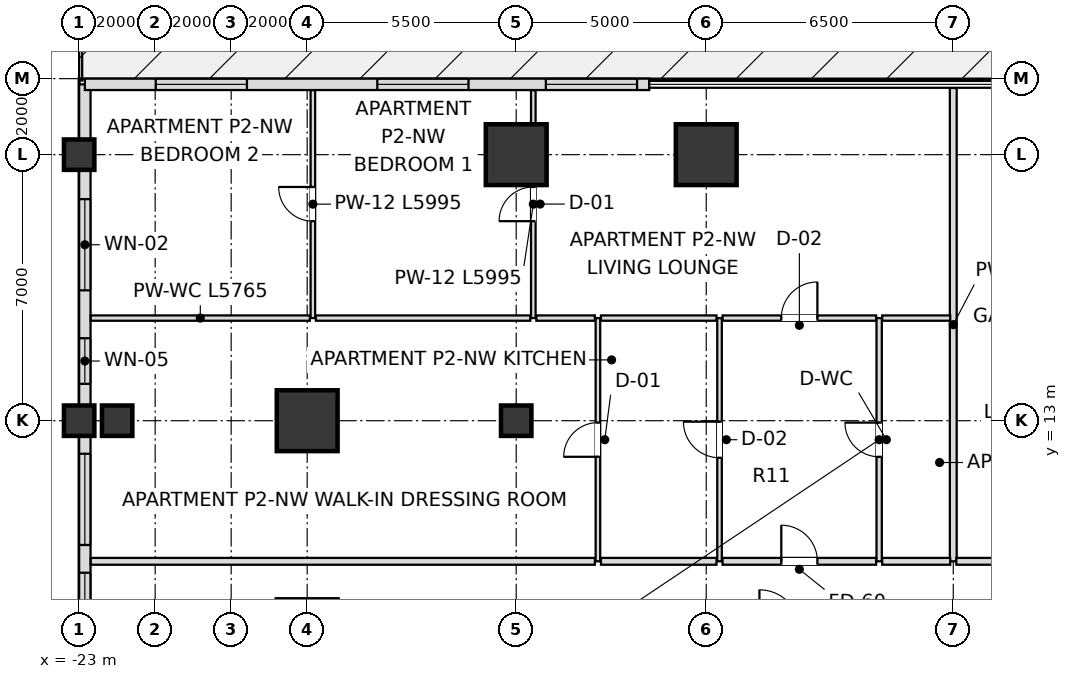
"""IFC4 building model, lengths in metres.
Left out: names, types, materials, properties, quantities, classifications, styles, units other than length and angle.
Written with IfcOpenShell. Run it as: python <this file> out.ifc"""

import sys

from ifc_helpers import new_model, si_unit, direction, frame, frame_2d, origin, origin_2d, place, context, subcontext, project, spatial, rectangle, extrude, element, fill, save


model = new_model("IFC4")
c1 = context("Model", 3, precision=1e-05, world=origin(), true_north=direction((0.0, 1.0)))
c2 = subcontext(c1, "Body", "Model", "MODEL_VIEW")
j1 = project(units=[si_unit("LENGTHUNIT", "METRE"), si_unit("PLANEANGLEUNIT", "RADIAN")], contexts=[c1])
p1 = place(None, origin())
s1 = spatial("IfcSite", under=j1, at=p1, CompositionType="ELEMENT")
p2 = place(p1, origin())
s2 = spatial("IfcBuilding", under=s1, at=p2, CompositionType="ELEMENT")
p3 = place(p2, frame((0.0, 0.0, 11.4)))
s3 = spatial("IfcBuildingStorey", under=s2, at=p3, CompositionType="ELEMENT", Elevation=11.4)
for number, where, z_axis, x_axis in (
    (1, (-6.5, 20.0, 0.0), (0.0, 0.0, 1.0), (1.0, 0.0, 0.0)),
    (2, (-11.5, 20.0, 0.0), (0.0, 0.0, 1.0), (1.0, 0.0, 0.0)),
    (3, (-17.0, 13.0, 0.0), (0.0, 0.0, 1.0), (1.0, 0.0, 0.0)),
):
    element("IfcColumn", number, at=place(p3, frame(where, z_axis=z_axis, x_axis=x_axis)), inside=s3, PredefinedType="USERDEFINED", context=c2, shape_type="SweptSolid", body=[
        extrude(rectangle(XDim=1.6, YDim=1.6, at=origin_2d()), origin(), (0.0, 0.0, 1.0), 5.4),
    ])
for number, where, z_axis, x_axis in (
    (4, (-23.0, 13.0, 0.0), (0.0, 0.0, 1.0), (1.0, 0.0, 0.0)),
    (5, (-23.0, 20.0, 0.0), (0.0, 0.0, 1.0), (1.0, 0.0, 0.0)),
    (6, (-11.5, 13.0, 0.0), (0.0, 0.0, 1.0), (1.0, 0.0, 0.0)),
    (7, (-22.0, 13.0, 0.0), (0.0, 0.0, 1.0), (1.0, 0.0, 0.0)),
):
    element("IfcColumn", number, at=place(p3, frame(where, z_axis=z_axis, x_axis=x_axis)), inside=s3, PredefinedType="COLUMN", context=c2, shape_type="SweptSolid", body=[
        extrude(rectangle(XDim=0.8, YDim=0.8, at=origin_2d()), origin(), (0.0, 0.0, 1.0), 5.4),
    ])
p4 = place(p3, frame((-22.85, 21.85, 0.0), z_axis=(0.0, 0.0, 1.0), x_axis=(0.0, -1.0, 0.0)))
e8 = element("IfcWall", 8, at=p4, inside=s3, PredefinedType="SOLIDWALL", context=c2, shape_type="SweptSolid", body=[
    extrude(rectangle(XDim=43.7, YDim=0.3, at=frame_2d((21.85, 0.0))), origin(), (0.0, 0.0, 1.0), 4.476),
])
p5 = place(p4, frame((3.02, 0.0, 0.8)))
e9 = element("IfcOpeningElement", 9, at=p5, cuts=e8, PredefinedType="OPENING", context=c2, shape_type="SweptSolid", body=[
    extrude(rectangle(XDim=2.4, YDim=2.2, at=frame_2d((1.2, 1.1))), frame((0.0, 0.16, 0.0), z_axis=(0.0, -1.0, 0.0), x_axis=(1.0, 0.0, 0.0)), (0.0, 0.0, 1.0), 0.32),
])
p6 = place(p4, frame((6.68, 0.0, 0.72)))
e10 = element("IfcOpeningElement", 10, at=p6, cuts=e8, PredefinedType="OPENING", context=c2, shape_type="SweptSolid", body=[
    extrude(rectangle(XDim=1.2, YDim=1.68, at=frame_2d((0.6, 0.84))), frame((0.0, 0.16, 0.0), z_axis=(0.0, -1.0, 0.0), x_axis=(1.0, 0.0, 0.0)), (0.0, 0.0, 1.0), 0.32),
])
p7 = place(p4, frame((9.72, 0.0, 0.8)))
e11 = element("IfcOpeningElement", 11, at=p7, cuts=e8, PredefinedType="OPENING", context=c2, shape_type="SweptSolid", body=[
    extrude(rectangle(XDim=2.4, YDim=2.2, at=frame_2d((1.2, 1.1))), frame((0.0, 0.16, 0.0), z_axis=(0.0, -1.0, 0.0), x_axis=(1.0, 0.0, 0.0)), (0.0, 0.0, 1.0), 0.32),
])
p8 = place(p4, frame((12.85, 0.0, 0.72)))
e12 = element("IfcOpeningElement", 12, at=p8, cuts=e8, PredefinedType="OPENING", context=c2, shape_type="SweptSolid", body=[
    extrude(rectangle(XDim=1.2, YDim=1.68, at=frame_2d((0.6, 0.84))), frame((0.0, 0.16, 0.0), z_axis=(0.0, -1.0, 0.0), x_axis=(1.0, 0.0, 0.0)), (0.0, 0.0, 1.0), 0.32),
])
p9 = place(p4, frame((14.995, 0.0, 0.8)))
e13 = element("IfcOpeningElement", 13, at=p9, cuts=e8, PredefinedType="OPENING", context=c2, shape_type="SweptSolid", body=[
    extrude(rectangle(XDim=2.4, YDim=2.2, at=frame_2d((1.2, 1.1))), frame((0.0, 0.16, 0.0), z_axis=(0.0, -1.0, 0.0), x_axis=(1.0, 0.0, 0.0)), (0.0, 0.0, 1.0), 0.32),
])
p10 = place(p4, frame((18.365, 0.0, 0.8)))
e14 = element("IfcOpeningElement", 14, at=p10, cuts=e8, PredefinedType="OPENING", context=c2, shape_type="SweptSolid", body=[
    extrude(rectangle(XDim=2.4, YDim=2.2, at=frame_2d((1.2, 1.1))), frame((0.0, 0.16, 0.0), z_axis=(0.0, -1.0, 0.0), x_axis=(1.0, 0.0, 0.0)), (0.0, 0.0, 1.0), 0.32),
])
p11 = place(p4, frame((22.935, 0.0, 0.8)))
e15 = element("IfcOpeningElement", 15, at=p11, cuts=e8, PredefinedType="OPENING", context=c2, shape_type="SweptSolid", body=[
    extrude(rectangle(XDim=2.4, YDim=2.2, at=frame_2d((1.2, 1.1))), frame((0.0, 0.16, 0.0), z_axis=(0.0, -1.0, 0.0), x_axis=(1.0, 0.0, 0.0)), (0.0, 0.0, 1.0), 0.32),
])
p12 = place(p4, frame((26.305, 0.0, 0.8)))
e16 = element("IfcOpeningElement", 16, at=p12, cuts=e8, PredefinedType="OPENING", context=c2, shape_type="SweptSolid", body=[
    extrude(rectangle(XDim=2.4, YDim=2.2, at=frame_2d((1.2, 1.1))), frame((0.0, 0.16, 0.0), z_axis=(0.0, -1.0, 0.0), x_axis=(1.0, 0.0, 0.0)), (0.0, 0.0, 1.0), 0.32),
])
p13 = place(p4, frame((29.65, 0.0, 0.72)))
e17 = element("IfcOpeningElement", 17, at=p13, cuts=e8, PredefinedType="OPENING", context=c2, shape_type="SweptSolid", body=[
    extrude(rectangle(XDim=1.2, YDim=1.68, at=frame_2d((0.6, 0.84))), frame((0.0, 0.16, 0.0), z_axis=(0.0, -1.0, 0.0), x_axis=(1.0, 0.0, 0.0)), (0.0, 0.0, 1.0), 0.32),
])
p14 = place(p4, frame((31.58, 0.0, 0.8)))
e18 = element("IfcOpeningElement", 18, at=p14, cuts=e8, PredefinedType="OPENING", context=c2, shape_type="SweptSolid", body=[
    extrude(rectangle(XDim=2.4, YDim=2.2, at=frame_2d((1.2, 1.1))), frame((0.0, 0.16, 0.0), z_axis=(0.0, -1.0, 0.0), x_axis=(1.0, 0.0, 0.0)), (0.0, 0.0, 1.0), 0.32),
])
p15 = place(p4, frame((37.15, 0.0, 0.8)))
e19 = element("IfcOpeningElement", 19, at=p15, cuts=e8, PredefinedType="OPENING", context=c2, shape_type="SweptSolid", body=[
    extrude(rectangle(XDim=2.4, YDim=2.2, at=frame_2d((1.2, 1.1))), frame((0.0, 0.16, 0.0), z_axis=(0.0, -1.0, 0.0), x_axis=(1.0, 0.0, 0.0)), (0.0, 0.0, 1.0), 0.32),
])
p16 = place(p3, frame((-22.85, 21.85, 0.0), z_axis=(0.0, 0.0, 1.0), x_axis=(1.0, 0.0, 0.0)))
e20 = element("IfcWall", 20, at=p16, inside=s3, PredefinedType="SOLIDWALL", context=c2, shape_type="SweptSolid", body=[
    extrude(rectangle(XDim=14.85, YDim=0.3, at=frame_2d((7.425, 0.0))), origin(), (0.0, 0.0, 1.0), 5.12),
])
p17 = place(p16, frame((1.865, 0.0, 0.8)))
e21 = element("IfcOpeningElement", 21, at=p17, cuts=e20, PredefinedType="OPENING", context=c2, shape_type="SweptSolid", body=[
    extrude(rectangle(XDim=2.4, YDim=2.2, at=frame_2d((1.2, 1.1))), frame((0.0, 0.16, 0.0), z_axis=(0.0, -1.0, 0.0), x_axis=(1.0, 0.0, 0.0)), (0.0, 0.0, 1.0), 0.32),
])
p18 = place(p16, frame((7.695, 0.0, 0.8)))
e22 = element("IfcOpeningElement", 22, at=p18, cuts=e20, PredefinedType="OPENING", context=c2, shape_type="SweptSolid", body=[
    extrude(rectangle(XDim=2.4, YDim=2.2, at=frame_2d((1.2, 1.1))), frame((0.0, 0.16, 0.0), z_axis=(0.0, -1.0, 0.0), x_axis=(1.0, 0.0, 0.0)), (0.0, 0.0, 1.0), 0.32),
])
p19 = place(p16, frame((12.13, 0.0, 0.8)))
e23 = element("IfcOpeningElement", 23, at=p19, cuts=e20, PredefinedType="OPENING", context=c2, shape_type="SweptSolid", body=[
    extrude(rectangle(XDim=2.4, YDim=2.2, at=frame_2d((1.2, 1.1))), frame((0.0, 0.16, 0.0), z_axis=(0.0, -1.0, 0.0), x_axis=(1.0, 0.0, 0.0)), (0.0, 0.0, 1.0), 0.32),
])
p20 = place(p3, frame((-16.85, 15.7, 0.0), z_axis=(0.0, 0.0, 1.0), x_axis=(0.0, 1.0, 0.0)))
e24 = element("IfcWall", 24, at=p20, inside=s3, PredefinedType="PARTITIONING", context=c2, shape_type="SweptSolid", body=[
    extrude(rectangle(XDim=5.995, YDim=0.12, at=frame_2d((2.998, 0.0))), origin(), (0.0, 0.0, 1.0), 4.476),
])
p21 = place(p20, frame((2.55, 0.0, 0.0)))
e25 = element("IfcOpeningElement", 25, at=p21, cuts=e24, PredefinedType="OPENING", context=c2, shape_type="SweptSolid", body=[
    extrude(rectangle(XDim=0.9, YDim=2.1, at=frame_2d((0.45, 1.05))), frame((0.0, 0.07, 0.0), z_axis=(0.0, -1.0, 0.0), x_axis=(1.0, 0.0, 0.0)), (0.0, 0.0, 1.0), 0.14),
])
p22 = place(p3, frame((-11.05, 15.7, 0.0), z_axis=(0.0, 0.0, 1.0), x_axis=(0.0, 1.0, 0.0)))
e26 = element("IfcWall", 26, at=p22, inside=s3, PredefinedType="PARTITIONING", context=c2, shape_type="SweptSolid", body=[
    extrude(rectangle(XDim=5.995, YDim=0.12, at=frame_2d((2.998, 0.0))), origin(), (0.0, 0.0, 1.0), 4.476),
])
p23 = place(p22, frame((2.55, 0.0, 0.0)))
e27 = element("IfcOpeningElement", 27, at=p23, cuts=e26, PredefinedType="OPENING", context=c2, shape_type="SweptSolid", body=[
    extrude(rectangle(XDim=0.9, YDim=2.1, at=frame_2d((0.45, 1.05))), frame((0.0, 0.07, 0.0), z_axis=(0.0, -1.0, 0.0), x_axis=(1.0, 0.0, 0.0)), (0.0, 0.0, 1.0), 0.14),
])
p24 = place(p3, frame((-9.35, 9.3, 0.0), z_axis=(0.0, 0.0, 1.0), x_axis=(0.0, 1.0, 0.0)))
e28 = element("IfcWall", 28, at=p24, inside=s3, PredefinedType="PARTITIONING", context=c2, shape_type="SweptSolid", body=[
    extrude(rectangle(XDim=6.4, YDim=0.12, at=frame_2d((3.2, 0.0))), origin(), (0.0, 0.0, 1.0), 4.41),
])
p25 = place(p24, frame((2.75, 0.0, 0.0)))
e29 = element("IfcOpeningElement", 29, at=p25, cuts=e28, PredefinedType="OPENING", context=c2, shape_type="SweptSolid", body=[
    extrude(rectangle(XDim=0.9, YDim=2.1, at=frame_2d((0.45, 1.05))), frame((0.0, 0.07, 0.0), z_axis=(0.0, -1.0, 0.0), x_axis=(1.0, 0.0, 0.0)), (0.0, 0.0, 1.0), 0.14),
])
p26 = place(p3, frame((-6.15, 9.3, 0.0), z_axis=(0.0, 0.0, 1.0), x_axis=(0.0, 1.0, 0.0)))
e30 = element("IfcWall", 30, at=p26, inside=s3, PredefinedType="PARTITIONING", context=c2, shape_type="SweptSolid", body=[
    extrude(rectangle(XDim=6.4, YDim=0.12, at=frame_2d((3.2, 0.0))), origin(), (0.0, 0.0, 1.0), 5.12),
])
p27 = place(p26, frame((2.725, 0.0, 0.0)))
e31 = element("IfcOpeningElement", 31, at=p27, cuts=e30, PredefinedType="OPENING", context=c2, shape_type="SweptSolid", body=[
    extrude(rectangle(XDim=0.95, YDim=2.1, at=frame_2d((0.475, 1.05))), frame((0.0, 0.07, 0.0), z_axis=(0.0, -1.0, 0.0), x_axis=(1.0, 0.0, 0.0)), (0.0, 0.0, 1.0), 0.14),
])
p28 = place(p3, frame((-1.95, 9.3, 0.0), z_axis=(0.0, 0.0, 1.0), x_axis=(0.0, 1.0, 0.0)))
e32 = element("IfcWall", 32, at=p28, inside=s3, PredefinedType="PARTITIONING", context=c2, shape_type="SweptSolid", body=[
    extrude(rectangle(XDim=6.4, YDim=0.14, at=frame_2d((3.2, 0.0))), origin(), (0.0, 0.0, 1.0), 5.12),
])
p29 = place(p28, frame((2.75, 0.0, 0.0)))
e33 = element("IfcOpeningElement", 33, at=p29, cuts=e32, PredefinedType="OPENING", context=c2, shape_type="SweptSolid", body=[
    extrude(rectangle(XDim=0.9, YDim=2.1, at=frame_2d((0.45, 1.05))), frame((0.0, 0.08, 0.0), z_axis=(0.0, -1.0, 0.0), x_axis=(1.0, 0.0, 0.0)), (0.0, 0.0, 1.0), 0.16),
])
p30 = place(p3, frame((0.0, 9.3, 0.0), z_axis=(0.0, 0.0, 1.0), x_axis=(0.0, 1.0, 0.0)))
e34 = element("IfcWall", 34, at=p30, inside=s3, PredefinedType="PARTITIONING", context=c2, shape_type="SweptSolid", body=[
    extrude(rectangle(XDim=12.455, YDim=0.18, at=frame_2d((6.228, 0.0))), origin(), (0.0, 0.0, 1.0), 4.476),
])
p31 = place(p3, frame((-22.695, 9.3, 0.0), z_axis=(0.0, 0.0, 1.0), x_axis=(1.0, 0.0, 0.0)))
e35 = element("IfcWall", 35, at=p31, inside=s3, PredefinedType="PARTITIONING", context=c2, shape_type="SweptSolid", body=[
    extrude(rectangle(XDim=13.265, YDim=0.18, at=frame_2d((6.633, 0.0))), origin(), (0.0, 0.0, 1.0), 4.41),
])
p32 = place(p3, frame((-9.27, 9.3, 0.0), z_axis=(0.0, 0.0, 1.0), x_axis=(1.0, 0.0, 0.0)))
e36 = element("IfcWall", 36, at=p32, inside=s3, PredefinedType="PARTITIONING", context=c2, shape_type="SweptSolid", body=[
    extrude(rectangle(XDim=3.04, YDim=0.18, at=frame_2d((1.52, 0.0))), origin(), (0.0, 0.0, 1.0), 4.41),
])
p33 = place(p3, frame((-6.07, 9.3, 0.0), z_axis=(0.0, 0.0, 1.0), x_axis=(1.0, 0.0, 0.0)))
e37 = element("IfcWall", 37, at=p33, inside=s3, PredefinedType="PARTITIONING", context=c2, shape_type="SweptSolid", body=[
    extrude(rectangle(XDim=4.04, YDim=0.18, at=frame_2d((2.02, 0.0))), origin(), (0.0, 0.0, 1.0), 5.12),
])
p34 = place(p33, frame((1.545, 0.0, 0.0)))
e38 = element("IfcOpeningElement", 38, at=p34, cuts=e37, PredefinedType="OPENING", context=c2, shape_type="SweptSolid", body=[
    extrude(rectangle(XDim=0.95, YDim=2.15, at=frame_2d((0.475, 1.075))), frame((0.0, 0.1, 0.0), z_axis=(0.0, -1.0, 0.0), x_axis=(1.0, 0.0, 0.0)), (0.0, 0.0, 1.0), 0.2),
])
p35 = place(p3, frame((-1.87, 9.3, 0.0), z_axis=(0.0, 0.0, 1.0), x_axis=(1.0, 0.0, 0.0)))
e39 = element("IfcWall", 39, at=p35, inside=s3, PredefinedType="PARTITIONING", context=c2, shape_type="SweptSolid", body=[
    extrude(rectangle(XDim=1.79, YDim=0.18, at=frame_2d((0.895, 0.0))), origin(), (0.0, 0.0, 1.0), 5.12),
])
p36 = place(p3, frame((0.08, 9.3, 0.0), z_axis=(0.0, 0.0, 1.0), x_axis=(1.0, 0.0, 0.0)))
e40 = element("IfcWall", 40, at=p36, inside=s3, PredefinedType="PARTITIONING", context=c2, shape_type="SweptSolid", body=[
    extrude(rectangle(XDim=14.34, YDim=0.18, at=frame_2d((7.17, 0.0))), origin(), (0.0, 0.0, 1.0), 4.41),
])
p37 = place(p36, frame((6.945, 0.0, 0.0)))
e41 = element("IfcOpeningElement", 41, at=p37, cuts=e40, PredefinedType="OPENING", context=c2, shape_type="SweptSolid", body=[
    extrude(rectangle(XDim=0.95, YDim=2.15, at=frame_2d((0.475, 1.075))), frame((0.0, 0.1, 0.0), z_axis=(0.0, -1.0, 0.0), x_axis=(1.0, 0.0, 0.0)), (0.0, 0.0, 1.0), 0.2),
])
p38 = place(p3, frame((-22.695, 15.7, 0.0), z_axis=(0.0, 0.0, 1.0), x_axis=(1.0, 0.0, 0.0)))
e42 = element("IfcWall", 42, at=p38, inside=s3, PredefinedType="PARTITIONING", context=c2, shape_type="SweptSolid", body=[
    extrude(rectangle(XDim=5.765, YDim=0.14, at=frame_2d((2.883, 0.0))), origin(), (0.0, 0.0, 1.0), 5.12),
])
p39 = place(p3, frame((-16.77, 15.7, 0.0), z_axis=(0.0, 0.0, 1.0), x_axis=(1.0, 0.0, 0.0)))
e43 = element("IfcWall", 43, at=p39, inside=s3, PredefinedType="PARTITIONING", context=c2, shape_type="SweptSolid", body=[
    extrude(rectangle(XDim=5.64, YDim=0.14, at=frame_2d((2.82, 0.0))), origin(), (0.0, 0.0, 1.0), 5.12),
])
p40 = place(p3, frame((-10.97, 15.7, 0.0), z_axis=(0.0, 0.0, 1.0), x_axis=(1.0, 0.0, 0.0)))
e44 = element("IfcWall", 44, at=p40, inside=s3, PredefinedType="PARTITIONING", context=c2, shape_type="SweptSolid", body=[
    extrude(rectangle(XDim=1.54, YDim=0.14, at=frame_2d((0.77, 0.0))), origin(), (0.0, 0.0, 1.0), 5.12),
])
p41 = place(p3, frame((-9.27, 15.7, 0.0), z_axis=(0.0, 0.0, 1.0), x_axis=(1.0, 0.0, 0.0)))
e45 = element("IfcWall", 45, at=p41, inside=s3, PredefinedType="PARTITIONING", context=c2, shape_type="SweptSolid", body=[
    extrude(rectangle(XDim=3.04, YDim=0.14, at=frame_2d((1.52, 0.0))), origin(), (0.0, 0.0, 1.0), 4.41),
])
p42 = place(p3, frame((-6.07, 15.7, 0.0), z_axis=(0.0, 0.0, 1.0), x_axis=(1.0, 0.0, 0.0)))
e46 = element("IfcWall", 46, at=p42, inside=s3, PredefinedType="PARTITIONING", context=c2, shape_type="SweptSolid", body=[
    extrude(rectangle(XDim=4.04, YDim=0.14, at=frame_2d((2.02, 0.0))), origin(), (0.0, 0.0, 1.0), 5.12),
])
p43 = place(p42, frame((1.545, 0.0, 0.0)))
e47 = element("IfcOpeningElement", 47, at=p43, cuts=e46, PredefinedType="OPENING", context=c2, shape_type="SweptSolid", body=[
    extrude(rectangle(XDim=0.95, YDim=2.1, at=frame_2d((0.475, 1.05))), frame((0.0, 0.08, 0.0), z_axis=(0.0, -1.0, 0.0), x_axis=(1.0, 0.0, 0.0)), (0.0, 0.0, 1.0), 0.16),
])
p44 = place(p3, frame((-1.87, 15.7, 0.0), z_axis=(0.0, 0.0, 1.0), x_axis=(1.0, 0.0, 0.0)))
e48 = element("IfcWall", 48, at=p44, inside=s3, PredefinedType="PARTITIONING", context=c2, shape_type="SweptSolid", body=[
    extrude(rectangle(XDim=1.79, YDim=0.14, at=frame_2d((0.895, 0.0))), origin(), (0.0, 0.0, 1.0), 5.12),
])
p45 = place(p5, origin())
e49 = element("IfcWindow", 49, at=p45, inside=s3, PartitioningType="SINGLE_PANEL", PredefinedType="WINDOW", context=c2, shape_type="SweptSolid", body=[
    extrude(rectangle(XDim=2.4, YDim=2.2, at=frame_2d((1.2, 1.1))), frame((0.0, 0.03, 0.0), z_axis=(0.0, -1.0, 0.0), x_axis=(1.0, 0.0, 0.0)), (0.0, 0.0, 1.0), 0.06),
])
fill(e9, e49)
p46 = place(p6, origin())
e50 = element("IfcWindow", 50, at=p46, inside=s3, PartitioningType="SINGLE_PANEL", PredefinedType="WINDOW", context=c2, shape_type="SweptSolid", body=[
    extrude(rectangle(XDim=1.2, YDim=1.68, at=frame_2d((0.6, 0.84))), frame((0.0, 0.03, 0.0), z_axis=(0.0, -1.0, 0.0), x_axis=(1.0, 0.0, 0.0)), (0.0, 0.0, 1.0), 0.06),
])
fill(e10, e50)
p47 = place(p7, origin())
e51 = element("IfcWindow", 51, at=p47, inside=s3, PartitioningType="SINGLE_PANEL", PredefinedType="WINDOW", context=c2, shape_type="SweptSolid", body=[
    extrude(rectangle(XDim=2.4, YDim=2.2, at=frame_2d((1.2, 1.1))), frame((0.0, 0.03, 0.0), z_axis=(0.0, -1.0, 0.0), x_axis=(1.0, 0.0, 0.0)), (0.0, 0.0, 1.0), 0.06),
])
fill(e11, e51)
p48 = place(p8, origin())
e52 = element("IfcWindow", 52, at=p48, inside=s3, PartitioningType="SINGLE_PANEL", PredefinedType="WINDOW", context=c2, shape_type="SweptSolid", body=[
    extrude(rectangle(XDim=1.2, YDim=1.68, at=frame_2d((0.6, 0.84))), frame((0.0, 0.03, 0.0), z_axis=(0.0, -1.0, 0.0), x_axis=(1.0, 0.0, 0.0)), (0.0, 0.0, 1.0), 0.06),
])
fill(e12, e52)
p49 = place(p17, origin())
e53 = element("IfcWindow", 53, at=p49, inside=s3, PartitioningType="SINGLE_PANEL", PredefinedType="WINDOW", context=c2, shape_type="SweptSolid", body=[
    extrude(rectangle(XDim=2.4, YDim=2.2, at=frame_2d((1.2, 1.1))), frame((0.0, 0.03, 0.0), z_axis=(0.0, -1.0, 0.0), x_axis=(1.0, 0.0, 0.0)), (0.0, 0.0, 1.0), 0.06),
])
fill(e21, e53)
p50 = place(p18, origin())
e54 = element("IfcWindow", 54, at=p50, inside=s3, PartitioningType="SINGLE_PANEL", PredefinedType="WINDOW", context=c2, shape_type="SweptSolid", body=[
    extrude(rectangle(XDim=2.4, YDim=2.2, at=frame_2d((1.2, 1.1))), frame((0.0, 0.03, 0.0), z_axis=(0.0, -1.0, 0.0), x_axis=(1.0, 0.0, 0.0)), (0.0, 0.0, 1.0), 0.06),
])
fill(e22, e54)
p51 = place(p19, origin())
e55 = element("IfcWindow", 55, at=p51, inside=s3, PartitioningType="SINGLE_PANEL", PredefinedType="WINDOW", context=c2, shape_type="SweptSolid", body=[
    extrude(rectangle(XDim=2.4, YDim=2.2, at=frame_2d((1.2, 1.1))), frame((0.0, 0.03, 0.0), z_axis=(0.0, -1.0, 0.0), x_axis=(1.0, 0.0, 0.0)), (0.0, 0.0, 1.0), 0.06),
])
fill(e23, e55)
p52 = place(p29, origin())
e56 = element("IfcDoor", 56, at=p52, inside=s3, OperationType="SINGLE_SWING_RIGHT", PredefinedType="DOOR", context=c2, shape_type="SweptSolid", body=[
    extrude(rectangle(XDim=0.9, YDim=2.1, at=frame_2d((0.45, 1.05))), frame((0.0, 0.025, 0.0), z_axis=(0.0, -1.0, 0.0), x_axis=(1.0, 0.0, 0.0)), (0.0, 0.0, 1.0), 0.05),
])
fill(e33, e56)
p53 = place(p34, origin())
e57 = element("IfcDoor", 57, at=p53, inside=s3, OperationType="SINGLE_SWING_LEFT", PredefinedType="DOOR", context=c2, shape_type="SweptSolid", body=[
    extrude(rectangle(XDim=0.95, YDim=2.15, at=frame_2d((0.475, 1.075))), frame((0.0, 0.025, 0.0), z_axis=(0.0, -1.0, 0.0), x_axis=(1.0, 0.0, 0.0)), (0.0, 0.0, 1.0), 0.05),
])
fill(e38, e57)
p54 = place(p27, origin())
e58 = element("IfcDoor", 58, at=p54, inside=s3, OperationType="SINGLE_SWING_RIGHT", PredefinedType="DOOR", context=c2, shape_type="SweptSolid", body=[
    extrude(rectangle(XDim=0.95, YDim=2.1, at=frame_2d((0.475, 1.05))), frame((0.0, 0.025, 0.0), z_axis=(0.0, -1.0, 0.0), x_axis=(1.0, 0.0, 0.0)), (0.0, 0.0, 1.0), 0.05),
])
fill(e31, e58)
p55 = place(p25, origin())
e59 = element("IfcDoor", 59, at=p55, inside=s3, OperationType="SINGLE_SWING_LEFT", PredefinedType="DOOR", context=c2, shape_type="SweptSolid", body=[
    extrude(rectangle(XDim=0.9, YDim=2.1, at=frame_2d((0.45, 1.05))), frame((0.0, 0.025, 0.0), z_axis=(0.0, -1.0, 0.0), x_axis=(1.0, 0.0, 0.0)), (0.0, 0.0, 1.0), 0.05),
])
fill(e29, e59)
p56 = place(p43, origin())
e60 = element("IfcDoor", 60, at=p56, inside=s3, OperationType="SINGLE_SWING_RIGHT", PredefinedType="DOOR", context=c2, shape_type="SweptSolid", body=[
    extrude(rectangle(XDim=0.95, YDim=2.1, at=frame_2d((0.475, 1.05))), frame((0.0, 0.025, 0.0), z_axis=(0.0, -1.0, 0.0), x_axis=(1.0, 0.0, 0.0)), (0.0, 0.0, 1.0), 0.05),
])
fill(e47, e60)
p57 = place(p23, origin())
e61 = element("IfcDoor", 61, at=p57, inside=s3, OperationType="SINGLE_SWING_LEFT", PredefinedType="DOOR", context=c2, shape_type="SweptSolid", body=[
    extrude(rectangle(XDim=0.9, YDim=2.1, at=frame_2d((0.45, 1.05))), frame((0.0, 0.025, 0.0), z_axis=(0.0, -1.0, 0.0), x_axis=(1.0, 0.0, 0.0)), (0.0, 0.0, 1.0), 0.05),
])
fill(e27, e61)
p58 = place(p21, origin())
e62 = element("IfcDoor", 62, at=p58, inside=s3, OperationType="SINGLE_SWING_RIGHT", PredefinedType="DOOR", context=c2, shape_type="SweptSolid", body=[
    extrude(rectangle(XDim=0.9, YDim=2.1, at=frame_2d((0.45, 1.05))), frame((0.0, 0.025, 0.0), z_axis=(0.0, -1.0, 0.0), x_axis=(1.0, 0.0, 0.0)), (0.0, 0.0, 1.0), 0.05),
])
fill(e25, e62)
save(model, sys.argv[1])
